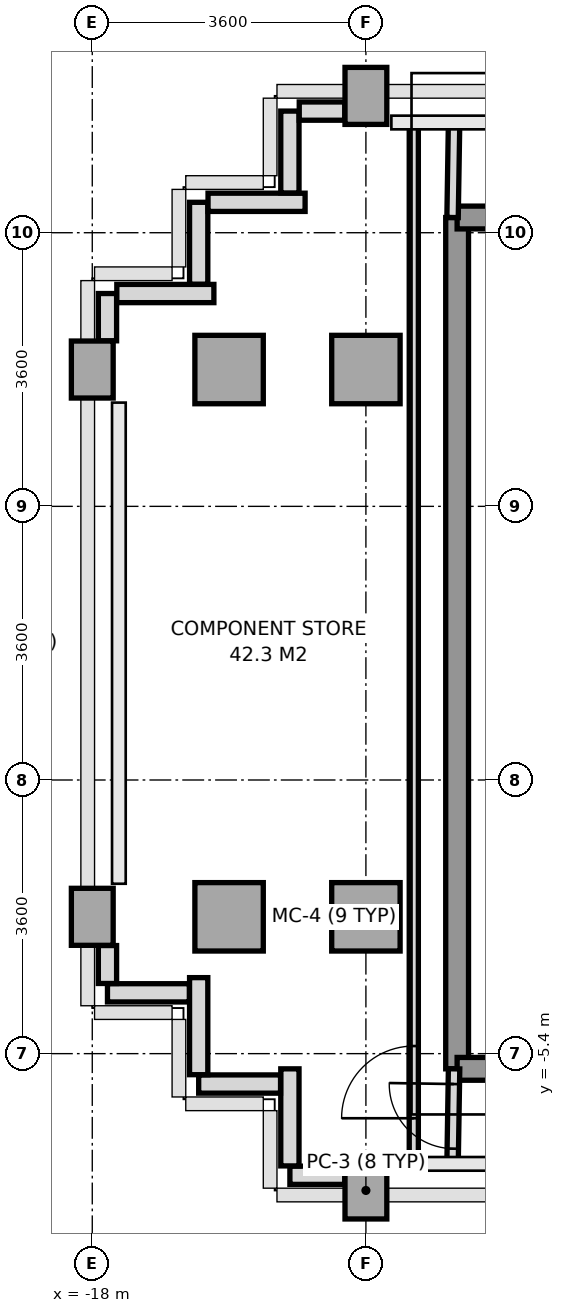
"""IFC4 building model, lengths in metres.
Left out: names, types, materials, properties, quantities, classifications, styles, units other than length and angle.
Written with IfcOpenShell. Run it as: python <this file> out.ifc"""

import sys

from ifc_helpers import new_model, si_unit, direction, frame, frame_2d, origin, origin_2d, place, context, subcontext, project, spatial, rectangle, extrude, source, transform, mapped, element, fill, save


model = new_model("IFC4")
c1 = context("Model", 3, precision=1e-05, world=origin(), true_north=direction((0.0, 1.0)))
c2 = subcontext(c1, "Body", "Model", "MODEL_VIEW")
j1 = project(units=[si_unit("LENGTHUNIT", "METRE"), si_unit("PLANEANGLEUNIT", "RADIAN")], contexts=[c1])
p1 = place(None, origin())
s1 = spatial("IfcSite", under=j1, at=p1, CompositionType="ELEMENT")
p2 = place(p1, origin())
s2 = spatial("IfcBuilding", under=s1, at=p2, CompositionType="ELEMENT")
p3 = place(p2, frame((0.0, 0.0, 236.4)))
s3 = spatial("IfcBuildingStorey", under=s2, at=p3, CompositionType="ELEMENT", Elevation=236.4)
m1 = source(origin(), c2, "Body", "SweptSolid", [
    extrude(rectangle(XDim=0.55, YDim=0.75, at=origin_2d()), origin(), (0.0, 0.0, 1.0), 3.01),
])
for number, where, z_axis, x_axis in (
    (1, (-18.0, -3.6, 0.0), (0.0, 0.0, 1.0), (1.0, 0.0, 0.0)),
    (2, (-18.0, 3.6, 0.0), (0.0, 0.0, 1.0), (1.0, 0.0, 0.0)),
):
    element("IfcColumn", number, at=place(p3, frame(where, z_axis=z_axis, x_axis=x_axis)), inside=s3, PredefinedType="COLUMN", context=c2, shape_type="MappedRepresentation", body=[
        mapped(m1, transform((0.0, 0.0, 0.0), x_axis=(1.0, 0.0, 0.0), y_axis=(0.0, 1.0, 0.0), z_axis=(0.0, 0.0, 1.0), scale=1.0)),
    ])
m2 = source(origin(), c2, "Body", "SweptSolid", [
    extrude(rectangle(XDim=0.9, YDim=0.9, at=origin_2d()), origin(), (0.0, 0.0, 1.0), 3.01),
])
for number, where, z_axis, x_axis in (
    (3, (-16.2, -3.6, 0.0), (0.0, 0.0, 1.0), (1.0, 0.0, 0.0)),
    (4, (-16.2, 3.6, 0.0), (0.0, 0.0, 1.0), (1.0, 0.0, 0.0)),
):
    element("IfcColumn", number, at=place(p3, frame(where, z_axis=z_axis, x_axis=x_axis)), inside=s3, PredefinedType="COLUMN", context=c2, shape_type="MappedRepresentation", body=[
        mapped(m2, transform((0.0, 0.0, 0.0), x_axis=(1.0, 0.0, 0.0), y_axis=(0.0, 1.0, 0.0), z_axis=(0.0, 0.0, 1.0), scale=1.0)),
    ])
p4 = place(p3, frame((-14.4, -7.2, 0.0), z_axis=(0.0, 0.0, 1.0), x_axis=(1.0, 0.0, 0.0)))
e5 = element("IfcColumn", 5, at=p4, inside=s3, PredefinedType="COLUMN", context=c2, shape_type="MappedRepresentation", body=[
    mapped(m1, transform((0.0, 0.0, 0.0), x_axis=(1.0, 0.0, 0.0), y_axis=(0.0, 1.0, 0.0), z_axis=(0.0, 0.0, 1.0), scale=1.0)),
])
for number, where, z_axis, x_axis in (
    (6, (-14.4, -3.6, 0.0), (0.0, 0.0, 1.0), (1.0, 0.0, 0.0)),
    (7, (-14.4, 3.6, 0.0), (0.0, 0.0, 1.0), (1.0, 0.0, 0.0)),
):
    element("IfcColumn", number, at=place(p3, frame(where, z_axis=z_axis, x_axis=x_axis)), inside=s3, PredefinedType="COLUMN", context=c2, shape_type="MappedRepresentation", body=[
        mapped(m2, transform((0.0, 0.0, 0.0), x_axis=(1.0, 0.0, 0.0), y_axis=(0.0, 1.0, 0.0), z_axis=(0.0, 0.0, 1.0), scale=1.0)),
    ])
p5 = place(p3, frame((-14.4, 7.2, 0.0), z_axis=(0.0, 0.0, 1.0), x_axis=(1.0, 0.0, 0.0)))
e8 = element("IfcColumn", 8, at=p5, inside=s3, PredefinedType="COLUMN", context=c2, shape_type="MappedRepresentation", body=[
    mapped(m1, transform((0.0, 0.0, 0.0), x_axis=(1.0, 0.0, 0.0), y_axis=(0.0, 1.0, 0.0), z_axis=(0.0, 0.0, 1.0), scale=1.0)),
])
p6 = place(p3, frame((-14.678, -7.0, 0.0), z_axis=(0.0, 0.0, 1.0), x_axis=(-1.0, 0.0, 0.0)))
e9 = element("IfcWall", 9, at=p6, inside=s3, PredefinedType="PARAPET", context=c2, shape_type="SweptSolid", body=[
    extrude(rectangle(XDim=0.722, YDim=0.24, at=frame_2d((0.361, 0.0))), origin(), (0.0, 0.0, 1.0), 1.15),
])
p7 = place(p3, frame((-15.4, -6.877, 0.0), z_axis=(0.0, 0.0, 1.0), x_axis=(0.0, 1.0, 0.0)))
e10 = element("IfcWall", 10, at=p7, inside=s3, PredefinedType="PARAPET", context=c2, shape_type="SweptSolid", body=[
    extrude(rectangle(XDim=1.277, YDim=0.24, at=frame_2d((0.638, 0.0))), origin(), (0.0, 0.0, 1.0), 1.15),
])
p8 = place(p3, frame((-15.523, -5.8, 0.0), z_axis=(0.0, 0.0, 1.0), x_axis=(-1.0, 0.0, 0.0)))
e11 = element("IfcWall", 11, at=p8, inside=s3, PredefinedType="PARAPET", context=c2, shape_type="SweptSolid", body=[
    extrude(rectangle(XDim=1.077, YDim=0.24, at=frame_2d((0.539, 0.0))), origin(), (0.0, 0.0, 1.0), 1.15),
])
p9 = place(p3, frame((-16.6, -5.677, 0.0), z_axis=(0.0, 0.0, 1.0), x_axis=(0.0, 1.0, 0.0)))
e12 = element("IfcWall", 12, at=p9, inside=s3, PredefinedType="PARAPET", context=c2, shape_type="SweptSolid", body=[
    extrude(rectangle(XDim=1.277, YDim=0.24, at=frame_2d((0.639, 0.0))), origin(), (0.0, 0.0, 1.0), 1.15),
])
p10 = place(p3, frame((-16.723, -4.6, 0.0), z_axis=(0.0, 0.0, 1.0), x_axis=(-1.0, 0.0, 0.0)))
e13 = element("IfcWall", 13, at=p10, inside=s3, PredefinedType="PARAPET", context=c2, shape_type="SweptSolid", body=[
    extrude(rectangle(XDim=1.077, YDim=0.24, at=frame_2d((0.539, 0.0))), origin(), (0.0, 0.0, 1.0), 1.15),
])
p11 = place(p3, frame((-17.8, -4.477, 0.0), z_axis=(0.0, 0.0, 1.0), x_axis=(0.0, 1.0, 0.0)))
e14 = element("IfcWall", 14, at=p11, inside=s3, PredefinedType="PARAPET", context=c2, shape_type="SweptSolid", body=[
    extrude(rectangle(XDim=0.499, YDim=0.24, at=frame_2d((0.25, 0.0))), origin(), (0.0, 0.0, 1.0), 1.15),
])
p12 = place(p3, frame((-17.8, 3.978, 0.0), z_axis=(0.0, 0.0, 1.0), x_axis=(0.0, 1.0, 0.0)))
e15 = element("IfcWall", 15, at=p12, inside=s3, PredefinedType="PARAPET", context=c2, shape_type="SweptSolid", body=[
    extrude(rectangle(XDim=0.622, YDim=0.24, at=frame_2d((0.311, 0.0))), origin(), (0.0, 0.0, 1.0), 1.15),
])
p13 = place(p3, frame((-17.677, 4.6, 0.0), z_axis=(0.0, 0.0, 1.0), x_axis=(1.0, 0.0, 0.0)))
e16 = element("IfcWall", 16, at=p13, inside=s3, PredefinedType="PARAPET", context=c2, shape_type="SweptSolid", body=[
    extrude(rectangle(XDim=1.277, YDim=0.24, at=frame_2d((0.639, 0.0))), origin(), (0.0, 0.0, 1.0), 1.15),
])
p14 = place(p3, frame((-16.6, 4.723, 0.0), z_axis=(0.0, 0.0, 1.0), x_axis=(0.0, 1.0, 0.0)))
e17 = element("IfcWall", 17, at=p14, inside=s3, PredefinedType="PARAPET", context=c2, shape_type="SweptSolid", body=[
    extrude(rectangle(XDim=1.077, YDim=0.24, at=frame_2d((0.539, 0.0))), origin(), (0.0, 0.0, 1.0), 1.15),
])
p15 = place(p3, frame((-16.477, 5.8, 0.0), z_axis=(0.0, 0.0, 1.0), x_axis=(1.0, 0.0, 0.0)))
e18 = element("IfcWall", 18, at=p15, inside=s3, PredefinedType="PARAPET", context=c2, shape_type="SweptSolid", body=[
    extrude(rectangle(XDim=1.277, YDim=0.24, at=frame_2d((0.639, 0.0))), origin(), (0.0, 0.0, 1.0), 1.15),
])
p16 = place(p3, frame((-15.4, 5.923, 0.0), z_axis=(0.0, 0.0, 1.0), x_axis=(0.0, 1.0, 0.0)))
e19 = element("IfcWall", 19, at=p16, inside=s3, PredefinedType="PARAPET", context=c2, shape_type="SweptSolid", body=[
    extrude(rectangle(XDim=1.077, YDim=0.24, at=frame_2d((0.539, 0.0))), origin(), (0.0, 0.0, 1.0), 1.15),
])
p17 = place(p3, frame((-15.277, 7.0, 0.0), z_axis=(0.0, 0.0, 1.0), x_axis=(1.0, 0.0, 0.0)))
e20 = element("IfcWall", 20, at=p17, inside=s3, PredefinedType="PARAPET", context=c2, shape_type="SweptSolid", body=[
    extrude(rectangle(XDim=0.599, YDim=0.24, at=frame_2d((0.3, 0.0))), origin(), (0.0, 0.0, 1.0), 1.15),
])
p18 = place(p3, frame((-13.2, -5.6, 0.0), z_axis=(0.0, 0.0, 1.0), x_axis=(0.0, 1.0, 0.0)))
e21 = element("IfcWall", 21, at=p18, inside=s3, PredefinedType="SHEAR", context=c2, shape_type="SweptSolid", body=[
    extrude(rectangle(XDim=11.2, YDim=0.3, at=frame_2d((5.6, 0.0))), origin(), (0.0, 0.0, 1.0), 3.01),
])
p19 = place(p3, frame((-13.2, 5.6, 0.0), z_axis=(0.0, 0.0, 1.0), x_axis=(1.0, 0.0, 0.0)))
e22 = element("IfcWall", 22, at=p19, inside=s3, PredefinedType="SHEAR", context=c2, shape_type="SweptSolid", body=[
    extrude(rectangle(XDim=1.844, YDim=0.3, at=frame_2d((0.922, 0.0))), origin(), (0.0, 0.0, 1.0), 3.01),
])
p20 = place(p3, frame((-13.2, -5.6, 0.0), z_axis=(0.0, 0.0, 1.0), x_axis=(1.0, 0.0, 0.0)))
e23 = element("IfcWall", 23, at=p20, inside=s3, PredefinedType="SHEAR", context=c2, shape_type="SweptSolid", body=[
    extrude(rectangle(XDim=7.8, YDim=0.3, at=frame_2d((3.9, 0.0))), origin(), (0.0, 0.0, 1.0), 3.01),
])
p21 = place(p3, frame((-13.26, 5.6, 0.0), z_axis=(0.0, 0.0, 1.0), x_axis=(0.016013571389, 0.999871774545, 0.0)))
e24 = element("IfcWall", 24, at=p21, inside=s3, PredefinedType="PARTITIONING", context=c2, shape_type="SweptSolid", body=[
    extrude(rectangle(XDim=1.25, YDim=0.15, at=frame_2d((0.625, 0.0))), origin(), (0.0, 0.0, 1.0), 3.01),
])
p22 = place(p3, frame((-13.26, -6.85, 0.0), z_axis=(0.0, 0.0, 1.0), x_axis=(0.016013571389, 0.999871774545, 0.0)))
e25 = element("IfcWall", 25, at=p22, inside=s3, PredefinedType="PARTITIONING", context=c2, shape_type="SweptSolid", body=[
    extrude(rectangle(XDim=1.25, YDim=0.15, at=frame_2d((0.625, 0.0))), origin(), (0.0, 0.0, 1.0), 3.01),
])
p23 = place(p22, frame((0.2, 0.0, 0.0)))
e26 = element("IfcOpeningElement", 26, at=p23, cuts=e25, PredefinedType="OPENING", context=c2, shape_type="SweptSolid", body=[
    extrude(rectangle(XDim=0.85, YDim=2.1, at=frame_2d((0.425, 1.05))), frame((0.0, 0.085, 0.0), z_axis=(0.0, -1.0, 0.0), x_axis=(1.0, 0.0, 0.0)), (0.0, 0.0, 1.0), 0.17),
])
p24 = place(p3, frame((-13.77, -6.85, 0.0), z_axis=(0.0, 0.0, 1.0), x_axis=(0.0, 1.0, 0.0)))
e27 = element("IfcWall", 27, at=p24, inside=s3, PredefinedType="PARTITIONING", context=c2, shape_type="SweptSolid", body=[
    extrude(rectangle(XDim=13.7, YDim=0.12, at=frame_2d((6.85, 0.0))), origin(), (0.0, 0.0, 1.0), 2.71),
])
p25 = place(p24, frame((0.6, 0.0, 0.0)))
e28 = element("IfcOpeningElement", 28, at=p25, cuts=e27, PredefinedType="OPENING", context=c2, shape_type="SweptSolid", body=[
    extrude(rectangle(XDim=0.95, YDim=2.15, at=frame_2d((0.475, 1.075))), frame((0.0, 0.07, 0.0), z_axis=(0.0, -1.0, 0.0), x_axis=(1.0, 0.0, 0.0)), (0.0, 0.0, 1.0), 0.14),
])
m3 = source(origin(), c2, "Body", "SweptSolid", [
    extrude(rectangle(XDim=0.95, YDim=2.15, at=frame_2d((0.475, 1.075))), frame((0.0, 0.025, 0.0), z_axis=(0.0, -1.0, 0.0), x_axis=(1.0, 0.0, 0.0)), (0.0, 0.0, 1.0), 0.05),
])
p26 = place(p25, origin())
e29 = element("IfcDoor", 29, at=p26, inside=s3, OperationType="SINGLE_SWING_LEFT", PredefinedType="DOOR", context=c2, shape_type="MappedRepresentation", body=[
    mapped(m3, transform((0.0, 0.0, 0.0), x_axis=(1.0, 0.0, 0.0), y_axis=(0.0, 1.0, 0.0), z_axis=(0.0, 0.0, 1.0), scale=1.0)),
])
fill(e28, e29)
m4 = source(origin(), c2, "Body", "SweptSolid", [
    extrude(rectangle(XDim=0.85, YDim=2.1, at=frame_2d((0.425, 1.05))), frame((0.0, 0.025, 0.0), z_axis=(0.0, -1.0, 0.0), x_axis=(1.0, 0.0, 0.0)), (0.0, 0.0, 1.0), 0.05),
])
p27 = place(p23, origin())
e30 = element("IfcDoor", 30, at=p27, inside=s3, OperationType="SINGLE_SWING_RIGHT", PredefinedType="DOOR", context=c2, shape_type="MappedRepresentation", body=[
    mapped(m4, transform((0.0, 0.0, 0.0), x_axis=(1.0, 0.0, 0.0), y_axis=(0.0, 1.0, 0.0), z_axis=(0.0, 0.0, 1.0), scale=1.0)),
])
fill(e26, e30)
save(model, sys.argv[1])
